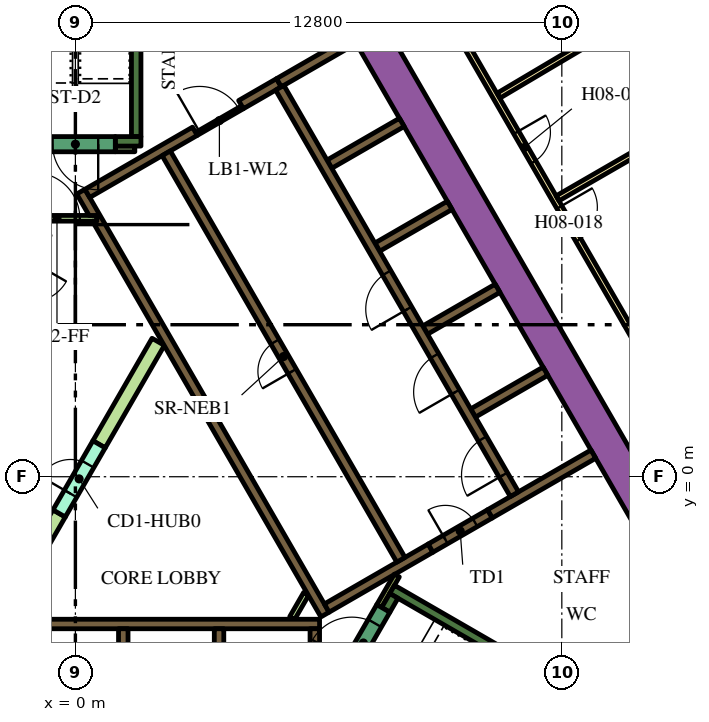
"""IFC4 building model, lengths in metres.
Left out: names, types, materials, properties, quantities, classifications, styles, units other than length and angle.
Written with IfcOpenShell. Run it as: python <this file> out.ifc"""

import sys

from ifc_helpers import new_model, si_unit, direction, frame, frame_2d, origin, place, context, subcontext, project, spatial, polyline, rectangle, outline, extrude, element, fill, save


model = new_model("IFC4")
c1 = context("Model", 3, precision=1e-05, world=origin(), true_north=direction((0.0, 1.0)))
c2 = subcontext(c1, "Body", "Model", "MODEL_VIEW")
j1 = project(units=[si_unit("LENGTHUNIT", "METRE"), si_unit("PLANEANGLEUNIT", "RADIAN")], contexts=[c1])
p1 = place(None, origin())
s1 = spatial("IfcSite", under=j1, at=p1, CompositionType="ELEMENT")
p2 = place(p1, origin())
s2 = spatial("IfcBuilding", under=s1, at=p2, CompositionType="ELEMENT")
p3 = place(p2, frame((0.0, 0.0, 107.1)))
s3 = spatial("IfcBuildingStorey", under=s2, at=p3, CompositionType="ELEMENT", Elevation=107.1)
p4 = place(p3, frame((6.711, 13.476, 0.0), z_axis=(0.0, 0.0, 1.0), x_axis=(0.500002723396, -0.866023831425, 0.0)))
e1 = element("IfcWall", 1, at=p4, inside=s3, PredefinedType="SOLIDWALL", context=c2, shape_type="SweptSolid", body=[
    extrude(rectangle(XDim=20.334, YDim=0.9, at=frame_2d((10.167, 0.0))), origin(), (0.0, 0.0, 1.0), 3.9),
])
p5 = place(p3, frame((11.695, -12.644, 0.0), z_axis=(0.0, 0.0, 1.0), x_axis=(0.500010229568, 0.86601949766, 0.0)))
e2 = element("IfcWall", 2, at=p5, inside=s3, PredefinedType="SOLIDWALL", context=c2, shape_type="SweptSolid", body=[
    extrude(rectangle(XDim=9.326, YDim=0.9, at=frame_2d((4.663, 0.0))), origin(), (0.0, 0.0, 1.0), 3.9),
])
p6 = place(p3, frame((8.334, -2.964, 0.0), z_axis=(0.0, 0.0, 1.0), x_axis=(0.866016039709, -0.500016218704, 0.0)))
e3 = element("IfcWall", 3, at=p6, inside=s3, PredefinedType="SOLIDWALL", context=c2, shape_type="SweptSolid", body=[
    extrude(rectangle(XDim=7.05, YDim=0.25, at=frame_2d((3.525, 0.0))), origin(), (0.0, 0.0, 1.0), 3.9),
])
p7 = place(p3, frame((8.168, -3.503, 0.0), z_axis=(0.0, 0.0, 1.0), x_axis=(0.49972245349, 0.866185586049, 0.0)))
e4 = element("IfcWall", 4, at=p7, inside=s3, PredefinedType="SOLIDWALL", context=c2, shape_type="SweptSolid", body=[
    extrude(rectangle(XDim=0.425, YDim=0.25, at=frame_2d((0.212, 0.0))), origin(), (0.0, 0.0, 1.0), 3.9),
])
p8 = place(p3, frame((1.6, 8.95, 0.0), z_axis=(0.0, 0.0, 1.0), x_axis=(0.0, 1.0, 0.0)))
e5 = element("IfcWall", 5, at=p8, inside=s3, PredefinedType="SOLIDWALL", context=c2, shape_type="SweptSolid", body=[
    extrude(rectangle(XDim=6.8, YDim=0.25, at=frame_2d((3.4, 0.0))), origin(), (0.0, 0.0, 1.0), 3.9),
])
p9 = place(p3, frame((1.05, 8.825, 0.0), z_axis=(0.0, 0.0, 1.0), x_axis=(1.0, 0.0, 0.0)))
e6 = element("IfcWall", 6, at=p9, inside=s3, PredefinedType="SOLIDWALL", context=c2, shape_type="SweptSolid", body=[
    extrude(rectangle(XDim=0.675, YDim=0.25, at=frame_2d((0.337, 0.0))), origin(), (0.0, 0.0, 1.0), 3.9),
])
p10 = place(p3, frame((-5.545, -3.875, 0.0), z_axis=(0.0, 0.0, 1.0), x_axis=(1.0, 0.0, 0.0)))
e7 = element("IfcWall", 7, at=p10, inside=s3, PredefinedType="SOLIDWALL", context=c2, shape_type="SweptSolid", body=[
    extrude(rectangle(XDim=11.97, YDim=0.25, at=frame_2d((5.985, 0.0))), origin(), (0.0, 0.0, 1.0), 3.9),
])
p11 = place(p3, frame((6.3, -7.268, 0.0), z_axis=(0.0, 0.0, 1.0), x_axis=(0.0, 1.0, 0.0)))
e8 = element("IfcWall", 8, at=p11, inside=s3, PredefinedType="SOLIDWALL", context=c2, shape_type="SweptSolid", body=[
    extrude(rectangle(XDim=3.268, YDim=0.25, at=frame_2d((1.634, 0.0))), origin(), (0.0, 0.0, 1.0), 3.9),
])
for number, where, z_axis, x_axis in (
    (9, (3.78, -4.0, 0.0), (0.0, 0.0, 1.0), (0.0, -1.0, 0.0)),
    (10, (1.26, -4.0, 0.0), (0.0, 0.0, 1.0), (0.0, -1.0, 0.0)),
    (11, (10.464, 1.677, 0.0), (0.0, 0.0, 1.0), (0.866, 0.5, 0.0)),
):
    element("IfcWall", number, at=place(p3, frame(where, z_axis=z_axis, x_axis=x_axis)), inside=s3, PredefinedType="SOLIDWALL", context=c2, shape_type="SweptSolid", body=[
        extrude(rectangle(XDim=2.2, YDim=0.25, at=frame_2d((1.1, 0.0))), origin(), (0.0, 0.0, 1.0), 3.9),
    ])
p12 = place(p3, frame((13.629, 0.594, 0.0), z_axis=(0.0, 0.0, 1.0), x_axis=(-0.86602790099, -0.499995674689, 0.0)))
e12 = element("IfcWall", 12, at=p12, inside=s3, PredefinedType="SOLIDWALL", context=c2, shape_type="SweptSolid", body=[
    extrude(rectangle(XDim=3.146, YDim=0.25, at=frame_2d((1.573, 0.0))), origin(), (0.0, 0.0, 1.0), 3.9),
])
p13 = place(p3, origin())
e13 = element("IfcWall", 13, at=p13, inside=s3, PredefinedType="SOLIDWALL", context=c2, shape_type="SweptSolid", body=[
    extrude(outline(polyline([(0.566, 6.725), (0.566, 6.875), (0.566, 6.875), (0.565, 6.875), (0.361, 6.875), (0.035, 7.439), (0.252, 7.564), (0.377, 7.348), (6.552, -3.348), (6.677, -3.564), (6.46, -3.689), (0.448, 6.725), (0.565, 6.725), (0.566, 6.725), (0.566, 6.725)])), origin(), (0.0, 0.0, 1.0), 3.9),
])
p14 = place(p3, frame((4.358, 9.791, 0.0), z_axis=(0.0, 0.0, 1.0), x_axis=(0.866079547155, 0.499906209203, 0.0)))
e14 = element("IfcWall", 14, at=p14, inside=s3, PredefinedType="SOLIDWALL", context=c2, shape_type="SweptSolid", body=[
    extrude(rectangle(XDim=1.15, YDim=0.25, at=frame_2d((0.575, 0.0))), origin(), (0.0, 0.0, 1.0), 3.9),
])
p15 = place(p3, frame((5.356, 10.367, 0.0), z_axis=(0.0, 0.0, 1.0), x_axis=(0.865978535641, 0.50008116922, 0.0)))
e15 = element("IfcWall", 15, at=p15, inside=s3, PredefinedType="SOLIDWALL", context=c2, shape_type="SweptSolid", body=[
    extrude(rectangle(XDim=2.278, YDim=0.25, at=frame_2d((1.139, 0.0))), origin(), (0.0, 0.0, 1.0), 3.9),
])
p16 = place(p3, frame((0.314, 7.456, 0.0), z_axis=(0.0, 0.0, 1.0), x_axis=(0.866013897511, 0.50001992892, 0.0)))
e16 = element("IfcWall", 16, at=p16, inside=s3, PredefinedType="SOLIDWALL", context=c2, shape_type="SweptSolid", body=[
    extrude(rectangle(XDim=3.268, YDim=0.25, at=frame_2d((1.634, 0.0))), origin(), (0.0, 0.0, 1.0), 3.9),
])
p17 = place(p3, frame((6.614, -3.456, 0.0), z_axis=(0.0, 0.0, 1.0), x_axis=(0.86602447079, 0.500001615989, 0.0)))
e17 = element("IfcWall", 17, at=p17, inside=s3, PredefinedType="SOLIDWALL", context=c2, shape_type="SweptSolid", body=[
    extrude(rectangle(XDim=3.154, YDim=0.25, at=frame_2d((1.577, 0.0))), origin(), (0.0, 0.0, 1.0), 3.9),
])
for number, where, z_axis, x_axis in (
    (18, (6.684, 8.224, 0.0), (0.0, 0.0, 1.0), (0.866, 0.5, 0.0)),
    (19, (7.944, 6.041, 0.0), (0.0, 0.0, 1.0), (0.866, 0.5, 0.0)),
    (20, (9.204, 3.859, 0.0), (0.0, 0.0, 1.0), (0.866, 0.5, 0.0)),
):
    element("IfcWall", number, at=place(p3, frame(where, z_axis=z_axis, x_axis=x_axis)), inside=s3, PredefinedType="SOLIDWALL", context=c2, shape_type="SweptSolid", body=[
        extrude(rectangle(XDim=2.2, YDim=0.25, at=frame_2d((1.1, 0.0))), origin(), (0.0, 0.0, 1.0), 3.9),
    ])
p18 = place(p3, frame((5.705, -3.718, 0.0), z_axis=(0.0, 0.0, 1.0), x_axis=(0.499962090823, 0.866047289552, 0.0)))
e21 = element("IfcWall", 21, at=p18, inside=s3, PredefinedType="PARTITIONING", context=c2, shape_type="SweptSolid", body=[
    extrude(rectangle(XDim=0.735, YDim=0.15, at=frame_2d((0.367, 0.0))), origin(), (0.0, 0.0, 1.0), 2.75),
])
p19 = place(p3, frame((8.459, -2.599, 0.0), z_axis=(0.0, 0.0, 1.0), x_axis=(-0.500041054325, -0.866001699761, 0.0)))
e22 = element("IfcWall", 22, at=p19, inside=s3, PredefinedType="PARTITIONING", context=c2, shape_type="SweptSolid", body=[
    extrude(rectangle(XDim=0.929, YDim=0.15, at=frame_2d((0.464, 0.0))), origin(), (0.0, 0.0, 1.0), 3.9),
])
e23 = element("IfcWall", 23, at=p13, inside=s3, PredefinedType="PARTITIONING", context=c2, shape_type="SweptSolid", body=[
    extrude(outline(polyline([(-0.59, -0.872), (-0.265, -1.059), (-1.822, -3.756), (-2.147, -3.568), (-0.59, -0.872)])), origin(), (0.0, 0.0, 1.0), 2.75),
])
e24 = element("IfcWall", 24, at=p13, inside=s3, PredefinedType="PARTITIONING", context=c2, shape_type="SweptSolid", body=[
    extrude(outline(polyline([(2.017, 3.643), (2.342, 3.456), (0.785, 0.76), (0.46, 0.947), (2.017, 3.643)])), origin(), (0.0, 0.0, 1.0), 2.75),
])
p20 = place(p3, frame((1.05, 8.625, 0.0), z_axis=(0.0, 0.0, 1.0), x_axis=(1.0, 0.0, 0.0)))
e25 = element("IfcWall", 25, at=p20, inside=s3, PredefinedType="PARTITIONING", context=c2, shape_type="SweptSolid", body=[
    extrude(rectangle(XDim=0.514, YDim=0.15, at=frame_2d((0.257, 0.0))), origin(), (0.0, 0.0, 1.0), 2.75),
])
p21 = place(p3, frame((11.553, -0.46, 0.0), z_axis=(0.0, 0.0, 1.0), x_axis=(-0.500006514828, 0.866021642414, 0.0)))
e26 = element("IfcWall", 26, at=p21, inside=s3, PredefinedType="SOLIDWALL", context=c2, shape_type="SweptSolid", body=[
    extrude(rectangle(XDim=12.35, YDim=0.25, at=frame_2d((6.175, 0.0))), origin(), (0.0, 0.0, 1.0), 3.9),
])
p22 = place(p21, frame((0.585, 0.0, 0.0)))
e27 = element("IfcOpeningElement", 27, at=p22, cuts=e26, PredefinedType="OPENING", context=c2, shape_type="SweptSolid", body=[
    extrude(rectangle(XDim=1.1, YDim=2.1, at=frame_2d((0.55, 1.05))), frame((0.0, 0.135, 0.0), z_axis=(0.0, -1.0, 0.0), x_axis=(1.0, 0.0, 0.0)), (0.0, 0.0, 1.0), 0.27),
])
p23 = place(p21, frame((3.105, 0.0, 0.0)))
e28 = element("IfcOpeningElement", 28, at=p23, cuts=e26, PredefinedType="OPENING", context=c2, shape_type="SweptSolid", body=[
    extrude(rectangle(XDim=1.1, YDim=2.1, at=frame_2d((0.55, 1.05))), frame((0.0, 0.135, 0.0), z_axis=(0.0, -1.0, 0.0), x_axis=(1.0, 0.0, 0.0)), (0.0, 0.0, 1.0), 0.27),
])
p24 = place(p21, frame((5.625, 0.0, 0.0)))
e29 = element("IfcOpeningElement", 29, at=p24, cuts=e26, PredefinedType="OPENING", context=c2, shape_type="SweptSolid", body=[
    extrude(rectangle(XDim=1.1, YDim=2.1, at=frame_2d((0.55, 1.05))), frame((0.0, 0.135, 0.0), z_axis=(0.0, -1.0, 0.0), x_axis=(1.0, 0.0, 0.0)), (0.0, 0.0, 1.0), 0.27),
])
p25 = place(p3, frame((8.565, -2.185, 0.0), z_axis=(0.0, 0.0, 1.0), x_axis=(-0.499997954832, 0.866026584559, 0.0)))
e30 = element("IfcWall", 30, at=p25, inside=s3, PredefinedType="SOLIDWALL", context=c2, shape_type="SweptSolid", body=[
    extrude(rectangle(XDim=12.35, YDim=0.25, at=frame_2d((6.175, 0.0))), origin(), (0.0, 0.0, 1.0), 3.9),
])
p26 = place(p25, frame((5.725, 0.0, 0.0)))
e31 = element("IfcOpeningElement", 31, at=p26, cuts=e30, PredefinedType="OPENING", context=c2, shape_type="SweptSolid", body=[
    extrude(rectangle(XDim=0.9, YDim=2.1, at=frame_2d((0.45, 1.05))), frame((0.0, 0.135, 0.0), z_axis=(0.0, -1.0, 0.0), x_axis=(1.0, 0.0, 0.0)), (0.0, 0.0, 1.0), 0.27),
])
p27 = place(p3, frame((7.053, -5.284, 0.0), z_axis=(0.0, 0.0, 1.0), x_axis=(0.500078061341, 0.865980330357, 0.0)))
e32 = element("IfcWall", 32, at=p27, inside=s3, PredefinedType="SOLIDWALL", context=c2, shape_type="SweptSolid", body=[
    extrude(rectangle(XDim=2.1, YDim=0.4, at=frame_2d((1.05, 0.0))), origin(), (0.0, 0.0, 1.0), 3.9),
])
p28 = place(p27, frame((0.45, 0.0, 0.0)))
e33 = element("IfcOpeningElement", 33, at=p28, cuts=e32, PredefinedType="OPENING", context=c2, shape_type="SweptSolid", body=[
    extrude(rectangle(XDim=1.2, YDim=2.1, at=frame_2d((0.6, 1.05))), frame((0.0, 0.21, 0.0), z_axis=(0.0, -1.0, 0.0), x_axis=(1.0, 0.0, 0.0)), (0.0, 0.0, 1.0), 0.42),
])
p29 = place(p3, frame((9.346, -1.879, 0.0), z_axis=(0.0, 0.0, 1.0), x_axis=(0.866047807691, 0.499961193289, 0.0)))
e34 = element("IfcWall", 34, at=p29, inside=s3, PredefinedType="SOLIDWALL", context=c2, shape_type="SweptSolid", body=[
    extrude(rectangle(XDim=1.8, YDim=0.25, at=frame_2d((0.9, 0.0))), origin(), (0.0, 0.0, 1.0), 3.9),
])
p30 = place(p29, frame((0.45, 0.0, 0.0)))
e35 = element("IfcOpeningElement", 35, at=p30, cuts=e34, PredefinedType="OPENING", context=c2, shape_type="SweptSolid", body=[
    extrude(rectangle(XDim=0.9, YDim=2.1, at=frame_2d((0.45, 1.05))), frame((0.0, 0.135, 0.0), z_axis=(0.0, -1.0, 0.0), x_axis=(1.0, 0.0, 0.0)), (0.0, 0.0, 1.0), 0.27),
])
p31 = place(p3, frame((1.05, 8.75, 0.0), z_axis=(0.0, 0.0, 1.0), x_axis=(-1.0, 0.0, 0.0)))
e36 = element("IfcWall", 36, at=p31, inside=s3, PredefinedType="SOLIDWALL", context=c2, shape_type="SweptSolid", body=[
    extrude(rectangle(XDim=2.1, YDim=0.4, at=frame_2d((1.05, 0.0))), origin(), (0.0, 0.0, 1.0), 3.9),
])
p32 = place(p31, frame((0.45, 0.0, 0.0)))
e37 = element("IfcOpeningElement", 37, at=p32, cuts=e36, PredefinedType="OPENING", context=c2, shape_type="SweptSolid", body=[
    extrude(rectangle(XDim=1.2, YDim=2.1, at=frame_2d((0.6, 1.05))), frame((0.0, 0.21, 0.0), z_axis=(0.0, -1.0, 0.0), x_axis=(1.0, 0.0, 0.0)), (0.0, 0.0, 1.0), 0.42),
])
p33 = place(p3, frame((-0.427, -0.966, 0.0), z_axis=(0.0, 0.0, 1.0), x_axis=(0.49994051562, 0.866059744384, 0.0)))
e38 = element("IfcWall", 38, at=p33, inside=s3, PredefinedType="PARTITIONING", context=c2, shape_type="SweptSolid", body=[
    extrude(rectangle(XDim=2.1, YDim=0.375, at=frame_2d((1.05, 0.0))), origin(), (0.0, 0.0, 1.0), 2.75),
])
p34 = place(p33, frame((0.6, 0.0, 0.0)))
e39 = element("IfcOpeningElement", 39, at=p34, cuts=e38, PredefinedType="OPENING", context=c2, shape_type="SweptSolid", body=[
    extrude(rectangle(XDim=0.9, YDim=2.1, at=frame_2d((0.45, 1.05))), frame((0.0, 0.198, 0.0), z_axis=(0.0, -1.0, 0.0), x_axis=(1.0, 0.0, 0.0)), (0.0, 0.0, 1.0), 0.395),
])
p35 = place(p3, frame((-1.534, 6.8, 0.0), z_axis=(0.0, 0.0, 1.0), x_axis=(1.0, 0.0, 0.0)))
e40 = element("IfcWall", 40, at=p35, inside=s3, PredefinedType="PARTITIONING", context=c2, shape_type="SweptSolid", body=[
    extrude(rectangle(XDim=2.1, YDim=0.15, at=frame_2d((1.05, 0.0))), origin(), (0.0, 0.0, 1.0), 2.75),
])
p36 = place(p35, frame((0.45, 0.0, 0.0)))
e41 = element("IfcOpeningElement", 41, at=p36, cuts=e40, PredefinedType="OPENING", context=c2, shape_type="SweptSolid", body=[
    extrude(rectangle(XDim=1.2, YDim=2.1, at=frame_2d((0.6, 1.05))), frame((0.0, 0.085, 0.0), z_axis=(0.0, -1.0, 0.0), x_axis=(1.0, 0.0, 0.0)), (0.0, 0.0, 1.0), 0.17),
])
p37 = place(p3, frame((3.183, 9.02, 0.0), z_axis=(0.0, 0.0, 1.0), x_axis=(0.866034573852, 0.49998411664, 0.0)))
e42 = element("IfcWall", 42, at=p37, inside=s3, PredefinedType="PARTITIONING", context=c2, shape_type="SweptSolid", body=[
    extrude(rectangle(XDim=1.4, YDim=0.09, at=frame_2d((0.7, 0.0))), origin(), (0.0, 0.0, 1.0), 2.75),
])
p38 = place(p37, frame((0.1, 0.0, 0.0)))
e43 = element("IfcOpeningElement", 43, at=p38, cuts=e42, PredefinedType="OPENING", context=c2, shape_type="SweptSolid", body=[
    extrude(rectangle(XDim=1.2, YDim=2.1, at=frame_2d((0.6, 1.05))), frame((0.0, 0.055, 0.0), z_axis=(0.0, -1.0, 0.0), x_axis=(1.0, 0.0, 0.0)), (0.0, 0.0, 1.0), 0.11),
])
p39 = place(p3, frame((6.163, 18.475, 0.0), z_axis=(0.0, 0.0, 1.0), x_axis=(0.500001317485, -0.866024643133, 0.0)))
e44 = element("IfcWall", 44, at=p39, inside=s3, PredefinedType="PARTITIONING", context=c2, shape_type="SweptSolid", body=[
    extrude(rectangle(XDim=25.767, YDim=0.15, at=frame_2d((12.883, 0.0))), origin(), (0.0, 0.0, 1.0), 2.75),
])
p40 = place(p39, frame((24.241, 0.0, 0.0)))
e45 = element("IfcOpeningElement", 45, at=p40, cuts=e44, PredefinedType="OPENING", context=c2, shape_type="SweptSolid", body=[
    extrude(rectangle(XDim=1.0, YDim=2.1, at=frame_2d((0.5, 1.05))), frame((0.0, 0.085, 0.0), z_axis=(0.0, -1.0, 0.0), x_axis=(1.0, 0.0, 0.0)), (0.0, 0.0, 1.0), 0.17),
])
p41 = place(p39, frame((13.144, 0.0, 0.0)))
e46 = element("IfcOpeningElement", 46, at=p41, cuts=e44, PredefinedType="OPENING", context=c2, shape_type="SweptSolid", body=[
    extrude(rectangle(XDim=1.0, YDim=2.1, at=frame_2d((0.5, 1.05))), frame((0.0, 0.085, 0.0), z_axis=(0.0, -1.0, 0.0), x_axis=(1.0, 0.0, 0.0)), (0.0, 0.0, 1.0), 0.17),
])
p42 = place(p39, frame((10.874, 0.0, 0.0)))
e47 = element("IfcOpeningElement", 47, at=p42, cuts=e44, PredefinedType="OPENING", context=c2, shape_type="SweptSolid", body=[
    extrude(rectangle(XDim=0.9, YDim=2.1, at=frame_2d((0.45, 1.05))), frame((0.0, 0.085, 0.0), z_axis=(0.0, -1.0, 0.0), x_axis=(1.0, 0.0, 0.0)), (0.0, 0.0, 1.0), 0.17),
])
p43 = place(p39, frame((3.718, 0.0, 0.0)))
e48 = element("IfcOpeningElement", 48, at=p43, cuts=e44, PredefinedType="OPENING", context=c2, shape_type="SweptSolid", body=[
    extrude(rectangle(XDim=1.0, YDim=2.1, at=frame_2d((0.5, 1.05))), frame((0.0, 0.085, 0.0), z_axis=(0.0, -1.0, 0.0), x_axis=(1.0, 0.0, 0.0)), (0.0, 0.0, 1.0), 0.17),
])
p44 = place(p39, frame((2.411, 0.0, 0.0)))
e49 = element("IfcOpeningElement", 49, at=p44, cuts=e44, PredefinedType="OPENING", context=c2, shape_type="SweptSolid", body=[
    extrude(rectangle(XDim=1.0, YDim=2.1, at=frame_2d((0.5, 1.05))), frame((0.0, 0.085, 0.0), z_axis=(0.0, -1.0, 0.0), x_axis=(1.0, 0.0, 0.0)), (0.0, 0.0, 1.0), 0.17),
])
p45 = place(p3, frame((17.379, 13.731, 0.0), z_axis=(0.0, 0.0, 1.0), x_axis=(-0.860132461691, -0.510070728768, 0.0)))
e50 = element("IfcWall", 50, at=p45, inside=s3, PredefinedType="PARTITIONING", context=c2, shape_type="SweptSolid", body=[
    extrude(rectangle(XDim=7.257, YDim=0.15, at=frame_2d((3.628, 0.0))), origin(), (0.0, 0.0, 1.0), 2.75),
])
p46 = place(p3, frame((18.484, 10.672, 0.0), z_axis=(0.0, 0.0, 1.0), x_axis=(-0.866019162053, -0.50001081084, 0.0)))
e51 = element("IfcWall", 51, at=p46, inside=s3, PredefinedType="PARTITIONING", context=c2, shape_type="SweptSolid", body=[
    extrude(rectangle(XDim=6.694, YDim=0.15, at=frame_2d((3.347, 0.0))), origin(), (0.0, 0.0, 1.0), 2.75),
])
p47 = place(p22, origin())
e52 = element("IfcDoor", 52, at=p47, inside=s3, OperationType="DOUBLE_DOOR_SLIDING", PredefinedType="DOOR", context=c2, shape_type="SweptSolid", body=[
    extrude(rectangle(XDim=1.1, YDim=2.1, at=frame_2d((0.55, 1.05))), frame((0.0, 0.025, 0.0), z_axis=(0.0, -1.0, 0.0), x_axis=(1.0, 0.0, 0.0)), (0.0, 0.0, 1.0), 0.05),
])
fill(e27, e52)
p48 = place(p23, origin())
e53 = element("IfcDoor", 53, at=p48, inside=s3, OperationType="DOUBLE_DOOR_SLIDING", PredefinedType="DOOR", context=c2, shape_type="SweptSolid", body=[
    extrude(rectangle(XDim=1.1, YDim=2.1, at=frame_2d((0.55, 1.05))), frame((0.0, 0.025, 0.0), z_axis=(0.0, -1.0, 0.0), x_axis=(1.0, 0.0, 0.0)), (0.0, 0.0, 1.0), 0.05),
])
fill(e28, e53)
p49 = place(p24, origin())
e54 = element("IfcDoor", 54, at=p49, inside=s3, OperationType="DOUBLE_DOOR_SLIDING", PredefinedType="DOOR", context=c2, shape_type="SweptSolid", body=[
    extrude(rectangle(XDim=1.1, YDim=2.1, at=frame_2d((0.55, 1.05))), frame((0.0, 0.025, 0.0), z_axis=(0.0, -1.0, 0.0), x_axis=(1.0, 0.0, 0.0)), (0.0, 0.0, 1.0), 0.05),
])
fill(e29, e54)
p50 = place(p26, origin())
e55 = element("IfcDoor", 55, at=p50, inside=s3, OperationType="SINGLE_SWING_LEFT", PredefinedType="DOOR", context=c2, shape_type="SweptSolid", body=[
    extrude(rectangle(XDim=0.9, YDim=2.1, at=frame_2d((0.45, 1.05))), frame((0.0, 0.025, 0.0), z_axis=(0.0, -1.0, 0.0), x_axis=(1.0, 0.0, 0.0)), (0.0, 0.0, 1.0), 0.05),
])
fill(e31, e55)
p51 = place(p28, origin())
e56 = element("IfcDoor", 56, at=p51, inside=s3, OperationType="SINGLE_SWING_LEFT", PredefinedType="DOOR", context=c2, shape_type="SweptSolid", body=[
    extrude(rectangle(XDim=1.2, YDim=2.1, at=frame_2d((0.6, 1.05))), frame((0.0, 0.025, 0.0), z_axis=(0.0, -1.0, 0.0), x_axis=(1.0, 0.0, 0.0)), (0.0, 0.0, 1.0), 0.05),
])
fill(e33, e56)
p52 = place(p30, origin())
e57 = element("IfcDoor", 57, at=p52, inside=s3, OperationType="SINGLE_SWING_LEFT", PredefinedType="DOOR", context=c2, shape_type="SweptSolid", body=[
    extrude(rectangle(XDim=0.9, YDim=2.1, at=frame_2d((0.45, 1.05))), frame((0.0, 0.025, 0.0), z_axis=(0.0, -1.0, 0.0), x_axis=(1.0, 0.0, 0.0)), (0.0, 0.0, 1.0), 0.05),
])
fill(e35, e57)
p53 = place(p32, origin())
e58 = element("IfcDoor", 58, at=p53, inside=s3, OperationType="SINGLE_SWING_LEFT", PredefinedType="DOOR", context=c2, shape_type="SweptSolid", body=[
    extrude(rectangle(XDim=1.2, YDim=2.1, at=frame_2d((0.6, 1.05))), frame((0.0, 0.025, 0.0), z_axis=(0.0, -1.0, 0.0), x_axis=(1.0, 0.0, 0.0)), (0.0, 0.0, 1.0), 0.05),
])
fill(e37, e58)
p54 = place(p34, origin())
e59 = element("IfcDoor", 59, at=p54, inside=s3, OperationType="SINGLE_SWING_LEFT", PredefinedType="DOOR", context=c2, shape_type="SweptSolid", body=[
    extrude(rectangle(XDim=0.9, YDim=2.1, at=frame_2d((0.45, 1.05))), frame((0.0, 0.025, 0.0), z_axis=(0.0, -1.0, 0.0), x_axis=(1.0, 0.0, 0.0)), (0.0, 0.0, 1.0), 0.05),
])
fill(e39, e59)
p55 = place(p36, origin())
e60 = element("IfcDoor", 60, at=p55, inside=s3, OperationType="SINGLE_SWING_LEFT", PredefinedType="DOOR", context=c2, shape_type="SweptSolid", body=[
    extrude(rectangle(XDim=1.2, YDim=2.1, at=frame_2d((0.6, 1.05))), frame((0.0, 0.025, 0.0), z_axis=(0.0, -1.0, 0.0), x_axis=(1.0, 0.0, 0.0)), (0.0, 0.0, 1.0), 0.05),
])
fill(e41, e60)
p56 = place(p38, origin())
e61 = element("IfcDoor", 61, at=p56, inside=s3, OperationType="SINGLE_SWING_LEFT", PredefinedType="DOOR", context=c2, shape_type="SweptSolid", body=[
    extrude(rectangle(XDim=1.2, YDim=2.1, at=frame_2d((0.6, 1.05))), frame((0.0, 0.025, 0.0), z_axis=(0.0, -1.0, 0.0), x_axis=(1.0, 0.0, 0.0)), (0.0, 0.0, 1.0), 0.05),
])
fill(e43, e61)
p57 = place(p41, origin())
e62 = element("IfcDoor", 62, at=p57, inside=s3, OperationType="SINGLE_SWING_LEFT", PredefinedType="DOOR", context=c2, shape_type="SweptSolid", body=[
    extrude(rectangle(XDim=1.0, YDim=2.1, at=frame_2d((0.5, 1.05))), frame((0.0, 0.025, 0.0), z_axis=(0.0, -1.0, 0.0), x_axis=(1.0, 0.0, 0.0)), (0.0, 0.0, 1.0), 0.05),
])
fill(e46, e62)
p58 = place(p42, origin())
e63 = element("IfcDoor", 63, at=p58, inside=s3, OperationType="SINGLE_SWING_RIGHT", PredefinedType="DOOR", context=c2, shape_type="SweptSolid", body=[
    extrude(rectangle(XDim=0.9, YDim=2.1, at=frame_2d((0.45, 1.05))), frame((0.0, 0.025, 0.0), z_axis=(0.0, -1.0, 0.0), x_axis=(1.0, 0.0, 0.0)), (0.0, 0.0, 1.0), 0.05),
])
fill(e47, e63)
save(model, sys.argv[1])
